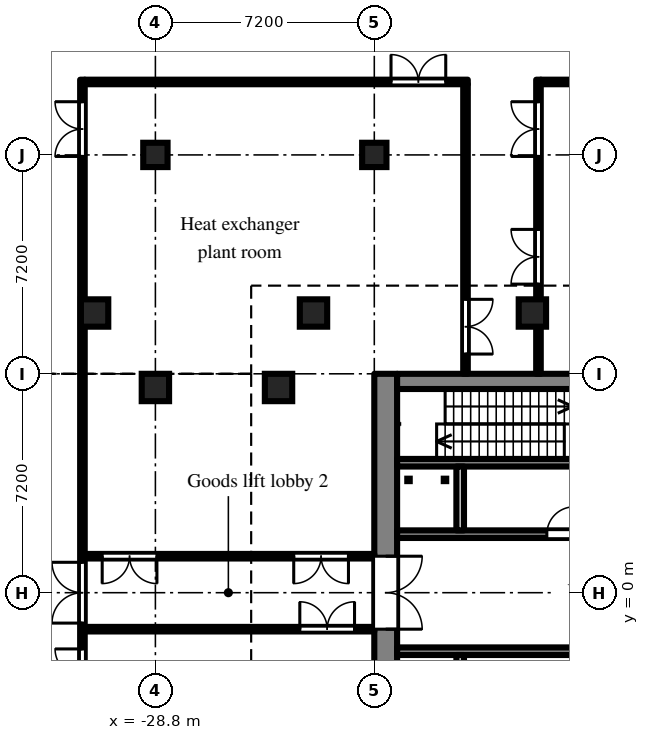
"""IFC4 building model, lengths in metres.
Left out: names, types, materials, properties, quantities, classifications, styles, units other than length and angle.
Written with IfcOpenShell. Run it as: python <this file> out.ifc"""

import sys

from ifc_helpers import new_model, si_unit, direction, frame, frame_2d, origin, origin_2d, place, context, subcontext, project, spatial, rectangle, extrude, element, fill, save


model = new_model("IFC4")
c1 = context("Model", 3, precision=1e-05, world=origin(), true_north=direction((0.0, 1.0)))
c2 = subcontext(c1, "Body", "Model", "MODEL_VIEW")
j1 = project(units=[si_unit("LENGTHUNIT", "METRE"), si_unit("PLANEANGLEUNIT", "RADIAN")], contexts=[c1])
p1 = place(None, origin())
s1 = spatial("IfcSite", under=j1, at=p1, CompositionType="ELEMENT")
p2 = place(p1, origin())
s2 = spatial("IfcBuilding", under=s1, at=p2, CompositionType="ELEMENT")
p3 = place(p2, frame((0.0, 0.0, -4.8)))
s3 = spatial("IfcBuildingStorey", under=s2, at=p3, CompositionType="ELEMENT", Elevation=-4.8)
for number, where, z_axis, x_axis in (
    (1, (-28.8, 6.75, -0.5), (0.0, 0.0, 1.0), (1.0, 0.0, 0.0)),
    (2, (-24.75, 6.75, -0.5), (0.0, 0.0, 1.0), (1.0, 0.0, 0.0)),
):
    element("IfcColumn", number, at=place(p3, frame(where, z_axis=z_axis, x_axis=x_axis)), inside=s3, PredefinedType="COLUMN", context=c2, shape_type="SweptSolid", body=[
        extrude(rectangle(XDim=0.9, YDim=0.9, at=origin_2d()), origin(), (0.0, 0.0, 1.0), 5.3),
    ])
for number, where, z_axis, x_axis in (
    (3, (-28.8, 14.4, -0.5), (0.0, 0.0, 1.0), (1.0, 0.0, 0.0)),
    (4, (-21.6, 14.4, -0.5), (0.0, 0.0, 1.0), (1.0, 0.0, 0.0)),
):
    element("IfcColumn", number, at=place(p3, frame(where, z_axis=z_axis, x_axis=x_axis)), inside=s3, PredefinedType="COLUMN", context=c2, shape_type="SweptSolid", body=[
        extrude(rectangle(XDim=0.8, YDim=0.8, at=origin_2d()), origin(), (0.0, 0.0, 1.0), 5.3),
    ])
for number, where, z_axis, x_axis in (
    (5, (-30.8, 9.2, -0.5), (0.0, 0.0, 1.0), (1.0, 0.0, 0.0)),
    (6, (-23.6, 9.2, -0.5), (0.0, 0.0, 1.0), (1.0, 0.0, 0.0)),
    (7, (-16.4, 9.2, -0.5), (0.0, 0.0, 1.0), (1.0, 0.0, 0.0)),
):
    element("IfcColumn", number, at=place(p3, frame(where, z_axis=z_axis, x_axis=x_axis)), inside=s3, PredefinedType="COLUMN", context=c2, shape_type="SweptSolid", body=[
        extrude(rectangle(XDim=0.9, YDim=0.9, at=origin_2d()), origin(), (0.0, 0.0, 1.0), 5.3),
    ])
p4 = place(p3, frame((-21.225, -7.2, 0.0), z_axis=(0.0, 0.0, 1.0), x_axis=(0.0, 1.0, 0.0)))
e8 = element("IfcWall", 8, at=p4, inside=s3, PredefinedType="SHEAR", context=c2, shape_type="SweptSolid", body=[
    extrude(rectangle(XDim=14.4, YDim=0.75, at=frame_2d((7.2, 0.0))), origin(), (0.0, 0.0, 1.0), 4.35),
])
p5 = place(p4, frame((6.0, 0.0, 0.0)))
e9 = element("IfcOpeningElement", 9, at=p5, cuts=e8, PredefinedType="OPENING", context=c2, shape_type="SweptSolid", body=[
    extrude(rectangle(XDim=2.4, YDim=2.2, at=frame_2d((1.2, 1.1))), frame((0.0, 0.385, 0.0), z_axis=(0.0, -1.0, 0.0), x_axis=(1.0, 0.0, 0.0)), (0.0, 0.0, 1.0), 0.77),
])
p6 = place(p3, frame((-7.9, 6.95, 0.0), z_axis=(0.0, 0.0, 1.0), x_axis=(-1.0, 0.0, 0.0)))
e10 = element("IfcWall", 10, at=p6, inside=s3, PredefinedType="SHEAR", context=c2, shape_type="SweptSolid", body=[
    extrude(rectangle(XDim=12.95, YDim=0.5, at=frame_2d((6.475, 0.0))), origin(), (0.0, 0.0, 1.0), 4.35),
])
p7 = place(p3, frame((-7.9, 1.925, 0.0), z_axis=(0.0, 0.0, 1.0), x_axis=(-1.0, 0.0, 0.0)))
e11 = element("IfcWall", 11, at=p7, inside=s3, PredefinedType="SHEAR", context=c2, shape_type="SweptSolid", body=[
    extrude(rectangle(XDim=12.95, YDim=0.25, at=frame_2d((6.475, 0.0))), origin(), (0.0, 0.0, 1.0), 4.35),
])
p8 = place(p7, frame((0.525, 0.0, 0.0)))
e12 = element("IfcOpeningElement", 12, at=p8, cuts=e11, PredefinedType="OPENING", context=c2, shape_type="SweptSolid", body=[
    extrude(rectangle(XDim=0.9, YDim=2.1, at=frame_2d((0.45, 1.05))), frame((0.0, 0.135, 0.0), z_axis=(0.0, -1.0, 0.0), x_axis=(1.0, 0.0, 0.0)), (0.0, 0.0, 1.0), 0.27),
])
p9 = place(p7, frame((2.625, 0.0, 0.0)))
e13 = element("IfcOpeningElement", 13, at=p9, cuts=e11, PredefinedType="OPENING", context=c2, shape_type="SweptSolid", body=[
    extrude(rectangle(XDim=1.1, YDim=2.1, at=frame_2d((0.55, 1.05))), frame((0.0, 0.135, 0.0), z_axis=(0.0, -1.0, 0.0), x_axis=(1.0, 0.0, 0.0)), (0.0, 0.0, 1.0), 0.27),
])
p10 = place(p7, frame((7.125, 0.0, 0.0)))
e14 = element("IfcOpeningElement", 14, at=p10, cuts=e11, PredefinedType="OPENING", context=c2, shape_type="SweptSolid", body=[
    extrude(rectangle(XDim=0.9, YDim=2.1, at=frame_2d((0.45, 1.05))), frame((0.0, 0.135, 0.0), z_axis=(0.0, -1.0, 0.0), x_axis=(1.0, 0.0, 0.0)), (0.0, 0.0, 1.0), 0.27),
])
p11 = place(p3, frame((-12.3, 4.275, 0.0), z_axis=(0.0, 0.0, 1.0), x_axis=(-1.0, 0.0, 0.0)))
e15 = element("IfcWall", 15, at=p11, inside=s3, PredefinedType="SHEAR", context=c2, shape_type="SweptSolid", body=[
    extrude(rectangle(XDim=8.55, YDim=0.25, at=frame_2d((4.275, 0.0))), origin(), (0.0, 0.0, 1.0), 4.35),
])
p12 = place(p3, frame((-18.775, 2.05, 0.0), z_axis=(0.0, 0.0, 1.0), x_axis=(0.0, 1.0, 0.0)))
e16 = element("IfcWall", 16, at=p12, inside=s3, PredefinedType="PARTITIONING", context=c2, shape_type="SweptSolid", body=[
    extrude(rectangle(XDim=2.1, YDim=0.25, at=frame_2d((1.05, 0.0))), origin(), (0.0, 0.0, 1.0), 4.35),
])
p13 = place(p3, frame((-7.9, -1.925, 0.0), z_axis=(0.0, 0.0, 1.0), x_axis=(-1.0, 0.0, 0.0)))
e17 = element("IfcWall", 17, at=p13, inside=s3, PredefinedType="SHEAR", context=c2, shape_type="SweptSolid", body=[
    extrude(rectangle(XDim=12.95, YDim=0.25, at=frame_2d((6.475, 0.0))), origin(), (0.0, 0.0, 1.0), 4.35),
])
p14 = place(p13, frame((0.525, 0.0, 0.0)))
e18 = element("IfcOpeningElement", 18, at=p14, cuts=e17, PredefinedType="OPENING", context=c2, shape_type="SweptSolid", body=[
    extrude(rectangle(XDim=0.9, YDim=2.1, at=frame_2d((0.45, 1.05))), frame((0.0, 0.135, 0.0), z_axis=(0.0, -1.0, 0.0), x_axis=(1.0, 0.0, 0.0)), (0.0, 0.0, 1.0), 0.27),
])
p15 = place(p13, frame((2.625, 0.0, 0.0)))
e19 = element("IfcOpeningElement", 19, at=p15, cuts=e17, PredefinedType="OPENING", context=c2, shape_type="SweptSolid", body=[
    extrude(rectangle(XDim=1.1, YDim=2.1, at=frame_2d((0.55, 1.05))), frame((0.0, 0.135, 0.0), z_axis=(0.0, -1.0, 0.0), x_axis=(1.0, 0.0, 0.0)), (0.0, 0.0, 1.0), 0.27),
])
p16 = place(p3, frame((-18.775, -2.05, 0.0), z_axis=(0.0, 0.0, 1.0), x_axis=(0.0, -1.0, 0.0)))
e20 = element("IfcWall", 20, at=p16, inside=s3, PredefinedType="PARTITIONING", context=c2, shape_type="SweptSolid", body=[
    extrude(rectangle(XDim=2.1, YDim=0.25, at=frame_2d((1.05, 0.0))), origin(), (0.0, 0.0, 1.0), 4.35),
])
p17 = place(p3, frame((-31.2, -16.875, 0.0), z_axis=(0.0, 0.0, 1.0), x_axis=(0.0, 1.0, 0.0)))
e21 = element("IfcWall", 21, at=p17, inside=s3, PredefinedType="PARTITIONING", context=c2, shape_type="SweptSolid", body=[
    extrude(rectangle(XDim=33.75, YDim=0.15, at=frame_2d((16.875, 0.0))), origin(), (0.0, 0.0, 1.0), 4.35),
])
p18 = place(p17, frame((15.875, 0.0, 0.0)))
e22 = element("IfcOpeningElement", 22, at=p18, cuts=e21, PredefinedType="OPENING", context=c2, shape_type="SweptSolid", body=[
    extrude(rectangle(XDim=2.0, YDim=2.1, at=frame_2d((1.0, 1.05))), frame((0.0, 0.085, 0.0), z_axis=(0.0, -1.0, 0.0), x_axis=(1.0, 0.0, 0.0)), (0.0, 0.0, 1.0), 0.17),
])
p19 = place(p17, frame((31.225, 0.0, 0.0)))
e23 = element("IfcOpeningElement", 23, at=p19, cuts=e21, PredefinedType="OPENING", context=c2, shape_type="SweptSolid", body=[
    extrude(rectangle(XDim=1.8, YDim=2.1, at=frame_2d((0.9, 1.05))), frame((0.0, 0.085, 0.0), z_axis=(0.0, -1.0, 0.0), x_axis=(1.0, 0.0, 0.0)), (0.0, 0.0, 1.0), 0.17),
])
p20 = place(p17, frame((13.225, 0.0, 0.0)))
e24 = element("IfcOpeningElement", 24, at=p20, cuts=e21, PredefinedType="OPENING", context=c2, shape_type="SweptSolid", body=[
    extrude(rectangle(XDim=1.8, YDim=2.1, at=frame_2d((0.9, 1.05))), frame((0.0, 0.085, 0.0), z_axis=(0.0, -1.0, 0.0), x_axis=(1.0, 0.0, 0.0)), (0.0, 0.0, 1.0), 0.17),
])
p21 = place(p3, frame((-31.125, -1.2, 0.0), z_axis=(0.0, 0.0, 1.0), x_axis=(1.0, 0.0, 0.0)))
e25 = element("IfcWall", 25, at=p21, inside=s3, PredefinedType="PARTITIONING", context=c2, shape_type="SweptSolid", body=[
    extrude(rectangle(XDim=9.525, YDim=0.15, at=frame_2d((4.762, 0.0))), origin(), (0.0, 0.0, 1.0), 4.35),
])
p22 = place(p21, frame((7.075, 0.0, 0.0)))
e26 = element("IfcOpeningElement", 26, at=p22, cuts=e25, PredefinedType="OPENING", context=c2, shape_type="SweptSolid", body=[
    extrude(rectangle(XDim=1.8, YDim=2.1, at=frame_2d((0.9, 1.05))), frame((0.0, 0.085, 0.0), z_axis=(0.0, -1.0, 0.0), x_axis=(1.0, 0.0, 0.0)), (0.0, 0.0, 1.0), 0.17),
])
p23 = place(p3, frame((-31.125, 1.2, 0.0), z_axis=(0.0, 0.0, 1.0), x_axis=(1.0, 0.0, 0.0)))
e27 = element("IfcWall", 27, at=p23, inside=s3, PredefinedType="PARTITIONING", context=c2, shape_type="SweptSolid", body=[
    extrude(rectangle(XDim=9.525, YDim=0.15, at=frame_2d((4.762, 0.0))), origin(), (0.0, 0.0, 1.0), 4.35),
])
p24 = place(p23, frame((0.575, 0.0, 0.0)))
e28 = element("IfcOpeningElement", 28, at=p24, cuts=e27, PredefinedType="OPENING", context=c2, shape_type="SweptSolid", body=[
    extrude(rectangle(XDim=1.8, YDim=2.1, at=frame_2d((0.9, 1.05))), frame((0.0, 0.085, 0.0), z_axis=(0.0, -1.0, 0.0), x_axis=(1.0, 0.0, 0.0)), (0.0, 0.0, 1.0), 0.17),
])
p25 = place(p23, frame((6.875, 0.0, 0.0)))
e29 = element("IfcOpeningElement", 29, at=p25, cuts=e27, PredefinedType="OPENING", context=c2, shape_type="SweptSolid", body=[
    extrude(rectangle(XDim=1.8, YDim=2.1, at=frame_2d((0.9, 1.05))), frame((0.0, 0.085, 0.0), z_axis=(0.0, -1.0, 0.0), x_axis=(1.0, 0.0, 0.0)), (0.0, 0.0, 1.0), 0.17),
])
p26 = place(p3, frame((-31.125, 16.8, 0.0), z_axis=(0.0, 0.0, 1.0), x_axis=(1.0, 0.0, 0.0)))
e30 = element("IfcWall", 30, at=p26, inside=s3, PredefinedType="PARTITIONING", context=c2, shape_type="SweptSolid", body=[
    extrude(rectangle(XDim=12.6, YDim=0.15, at=frame_2d((6.3, 0.0))), origin(), (0.0, 0.0, 1.0), 4.35),
])
p27 = place(p26, frame((10.075, 0.0, 0.0)))
e31 = element("IfcOpeningElement", 31, at=p27, cuts=e30, PredefinedType="OPENING", context=c2, shape_type="SweptSolid", body=[
    extrude(rectangle(XDim=1.8, YDim=2.1, at=frame_2d((0.9, 1.05))), frame((0.0, 0.085, 0.0), z_axis=(0.0, -1.0, 0.0), x_axis=(1.0, 0.0, 0.0)), (0.0, 0.0, 1.0), 0.17),
])
p28 = place(p3, frame((-18.6, 7.2, 0.0), z_axis=(0.0, 0.0, 1.0), x_axis=(0.0, 1.0, 0.0)))
e32 = element("IfcWall", 32, at=p28, inside=s3, PredefinedType="PARTITIONING", context=c2, shape_type="SweptSolid", body=[
    extrude(rectangle(XDim=9.525, YDim=0.15, at=frame_2d((4.763, 0.0))), origin(), (0.0, 0.0, 1.0), 4.35),
])
p29 = place(p28, frame((0.65, 0.0, 0.0)))
e33 = element("IfcOpeningElement", 33, at=p29, cuts=e32, PredefinedType="OPENING", context=c2, shape_type="SweptSolid", body=[
    extrude(rectangle(XDim=1.8, YDim=2.1, at=frame_2d((0.9, 1.05))), frame((0.0, 0.085, 0.0), z_axis=(0.0, -1.0, 0.0), x_axis=(1.0, 0.0, 0.0)), (0.0, 0.0, 1.0), 0.17),
])
p30 = place(p3, frame((-16.2, 7.2, 0.0), z_axis=(0.0, 0.0, 1.0), x_axis=(0.0, 1.0, 0.0)))
e34 = element("IfcWall", 34, at=p30, inside=s3, PredefinedType="PARTITIONING", context=c2, shape_type="SweptSolid", body=[
    extrude(rectangle(XDim=9.675, YDim=0.15, at=frame_2d((4.837, 0.0))), origin(), (0.0, 0.0, 1.0), 4.35),
])
p31 = place(p30, frame((2.95, 0.0, 0.0)))
e35 = element("IfcOpeningElement", 35, at=p31, cuts=e34, PredefinedType="OPENING", context=c2, shape_type="SweptSolid", body=[
    extrude(rectangle(XDim=1.8, YDim=2.1, at=frame_2d((0.9, 1.05))), frame((0.0, 0.085, 0.0), z_axis=(0.0, -1.0, 0.0), x_axis=(1.0, 0.0, 0.0)), (0.0, 0.0, 1.0), 0.17),
])
p32 = place(p30, frame((7.15, 0.0, 0.0)))
e36 = element("IfcOpeningElement", 36, at=p32, cuts=e34, PredefinedType="OPENING", context=c2, shape_type="SweptSolid", body=[
    extrude(rectangle(XDim=1.8, YDim=2.1, at=frame_2d((0.9, 1.05))), frame((0.0, 0.085, 0.0), z_axis=(0.0, -1.0, 0.0), x_axis=(1.0, 0.0, 0.0)), (0.0, 0.0, 1.0), 0.17),
])
p33 = place(p3, frame((-16.125, 16.8, 0.0), z_axis=(0.0, 0.0, 1.0), x_axis=(1.0, 0.0, 0.0)))
e37 = element("IfcWall", 37, at=p33, inside=s3, PredefinedType="PARTITIONING", context=c2, shape_type="SweptSolid", body=[
    extrude(rectangle(XDim=15.0, YDim=0.15, at=frame_2d((7.5, 0.0))), origin(), (0.0, 0.0, 1.0), 4.35),
])
p34 = place(p33, frame((12.475, 0.0, 0.0)))
e38 = element("IfcOpeningElement", 38, at=p34, cuts=e37, PredefinedType="OPENING", context=c2, shape_type="SweptSolid", body=[
    extrude(rectangle(XDim=1.8, YDim=2.1, at=frame_2d((0.9, 1.05))), frame((0.0, 0.085, 0.0), z_axis=(0.0, -1.0, 0.0), x_axis=(1.0, 0.0, 0.0)), (0.0, 0.0, 1.0), 0.17),
])
p35 = place(p5, frame((2.4, 0.0, 0.0), z_axis=(0.0, 0.0, 1.0), x_axis=(-1.0, 0.0, 0.0)))
e39 = element("IfcDoor", 39, at=p35, inside=s3, OperationType="DOUBLE_DOOR_DOUBLE_SWING", PredefinedType="DOOR", context=c2, shape_type="SweptSolid", body=[
    extrude(rectangle(XDim=2.4, YDim=2.2, at=frame_2d((1.2, 1.1))), frame((0.0, 0.025, 0.0), z_axis=(0.0, -1.0, 0.0), x_axis=(1.0, 0.0, 0.0)), (0.0, 0.0, 1.0), 0.05),
])
fill(e9, e39)
p36 = place(p10, frame((0.9, 0.0, 0.0), z_axis=(0.0, 0.0, 1.0), x_axis=(-1.0, 0.0, 0.0)))
e40 = element("IfcDoor", 40, at=p36, inside=s3, OperationType="SINGLE_SWING_RIGHT", PredefinedType="DOOR", context=c2, shape_type="SweptSolid", body=[
    extrude(rectangle(XDim=0.9, YDim=2.1, at=frame_2d((0.45, 1.05))), frame((0.0, 0.025, 0.0), z_axis=(0.0, -1.0, 0.0), x_axis=(1.0, 0.0, 0.0)), (0.0, 0.0, 1.0), 0.05),
])
fill(e14, e40)
p37 = place(p18, origin())
e41 = element("IfcDoor", 41, at=p37, inside=s3, OperationType="DOUBLE_DOOR_DOUBLE_SWING", PredefinedType="DOOR", context=c2, shape_type="SweptSolid", body=[
    extrude(rectangle(XDim=2.0, YDim=2.1, at=frame_2d((1.0, 1.05))), frame((0.0, 0.025, 0.0), z_axis=(0.0, -1.0, 0.0), x_axis=(1.0, 0.0, 0.0)), (0.0, 0.0, 1.0), 0.05),
])
fill(e22, e41)
p38 = place(p31, origin())
e42 = element("IfcDoor", 42, at=p38, inside=s3, OperationType="DOUBLE_DOOR_DOUBLE_SWING", PredefinedType="DOOR", context=c2, shape_type="SweptSolid", body=[
    extrude(rectangle(XDim=1.8, YDim=2.1, at=frame_2d((0.9, 1.05))), frame((0.0, 0.025, 0.0), z_axis=(0.0, -1.0, 0.0), x_axis=(1.0, 0.0, 0.0)), (0.0, 0.0, 1.0), 0.05),
])
fill(e35, e42)
p39 = place(p32, origin())
e43 = element("IfcDoor", 43, at=p39, inside=s3, OperationType="DOUBLE_DOOR_DOUBLE_SWING", PredefinedType="DOOR", context=c2, shape_type="SweptSolid", body=[
    extrude(rectangle(XDim=1.8, YDim=2.1, at=frame_2d((0.9, 1.05))), frame((0.0, 0.025, 0.0), z_axis=(0.0, -1.0, 0.0), x_axis=(1.0, 0.0, 0.0)), (0.0, 0.0, 1.0), 0.05),
])
fill(e36, e43)
p40 = place(p19, origin())
e44 = element("IfcDoor", 44, at=p40, inside=s3, OperationType="DOUBLE_DOOR_DOUBLE_SWING", PredefinedType="DOOR", context=c2, shape_type="SweptSolid", body=[
    extrude(rectangle(XDim=1.8, YDim=2.1, at=frame_2d((0.9, 1.05))), frame((0.0, 0.025, 0.0), z_axis=(0.0, -1.0, 0.0), x_axis=(1.0, 0.0, 0.0)), (0.0, 0.0, 1.0), 0.05),
])
fill(e23, e44)
p41 = place(p24, frame((1.8, 0.0, 0.0), z_axis=(0.0, 0.0, 1.0), x_axis=(-1.0, 0.0, 0.0)))
e45 = element("IfcDoor", 45, at=p41, inside=s3, OperationType="DOUBLE_DOOR_DOUBLE_SWING", PredefinedType="DOOR", context=c2, shape_type="SweptSolid", body=[
    extrude(rectangle(XDim=1.8, YDim=2.1, at=frame_2d((0.9, 1.05))), frame((0.0, 0.025, 0.0), z_axis=(0.0, -1.0, 0.0), x_axis=(1.0, 0.0, 0.0)), (0.0, 0.0, 1.0), 0.05),
])
fill(e28, e45)
p42 = place(p25, frame((1.8, 0.0, 0.0), z_axis=(0.0, 0.0, 1.0), x_axis=(-1.0, 0.0, 0.0)))
e46 = element("IfcDoor", 46, at=p42, inside=s3, OperationType="DOUBLE_DOOR_DOUBLE_SWING", PredefinedType="DOOR", context=c2, shape_type="SweptSolid", body=[
    extrude(rectangle(XDim=1.8, YDim=2.1, at=frame_2d((0.9, 1.05))), frame((0.0, 0.025, 0.0), z_axis=(0.0, -1.0, 0.0), x_axis=(1.0, 0.0, 0.0)), (0.0, 0.0, 1.0), 0.05),
])
fill(e29, e46)
p43 = place(p27, origin())
e47 = element("IfcDoor", 47, at=p43, inside=s3, OperationType="DOUBLE_DOOR_DOUBLE_SWING", PredefinedType="DOOR", context=c2, shape_type="SweptSolid", body=[
    extrude(rectangle(XDim=1.8, YDim=2.1, at=frame_2d((0.9, 1.05))), frame((0.0, 0.025, 0.0), z_axis=(0.0, -1.0, 0.0), x_axis=(1.0, 0.0, 0.0)), (0.0, 0.0, 1.0), 0.05),
])
fill(e31, e47)
p44 = place(p29, frame((1.8, 0.0, 0.0), z_axis=(0.0, 0.0, 1.0), x_axis=(-1.0, 0.0, 0.0)))
e48 = element("IfcDoor", 48, at=p44, inside=s3, OperationType="DOUBLE_DOOR_DOUBLE_SWING", PredefinedType="DOOR", context=c2, shape_type="SweptSolid", body=[
    extrude(rectangle(XDim=1.8, YDim=2.1, at=frame_2d((0.9, 1.05))), frame((0.0, 0.025, 0.0), z_axis=(0.0, -1.0, 0.0), x_axis=(1.0, 0.0, 0.0)), (0.0, 0.0, 1.0), 0.05),
])
fill(e33, e48)
p45 = place(p20, origin())
e49 = element("IfcDoor", 49, at=p45, inside=s3, OperationType="DOUBLE_DOOR_DOUBLE_SWING", PredefinedType="DOOR", context=c2, shape_type="SweptSolid", body=[
    extrude(rectangle(XDim=1.8, YDim=2.1, at=frame_2d((0.9, 1.05))), frame((0.0, 0.025, 0.0), z_axis=(0.0, -1.0, 0.0), x_axis=(1.0, 0.0, 0.0)), (0.0, 0.0, 1.0), 0.05),
])
fill(e24, e49)
p46 = place(p22, origin())
e50 = element("IfcDoor", 50, at=p46, inside=s3, OperationType="DOUBLE_DOOR_DOUBLE_SWING", PredefinedType="DOOR", context=c2, shape_type="SweptSolid", body=[
    extrude(rectangle(XDim=1.8, YDim=2.1, at=frame_2d((0.9, 1.05))), frame((0.0, 0.025, 0.0), z_axis=(0.0, -1.0, 0.0), x_axis=(1.0, 0.0, 0.0)), (0.0, 0.0, 1.0), 0.05),
])
fill(e26, e50)
save(model, sys.argv[1])
